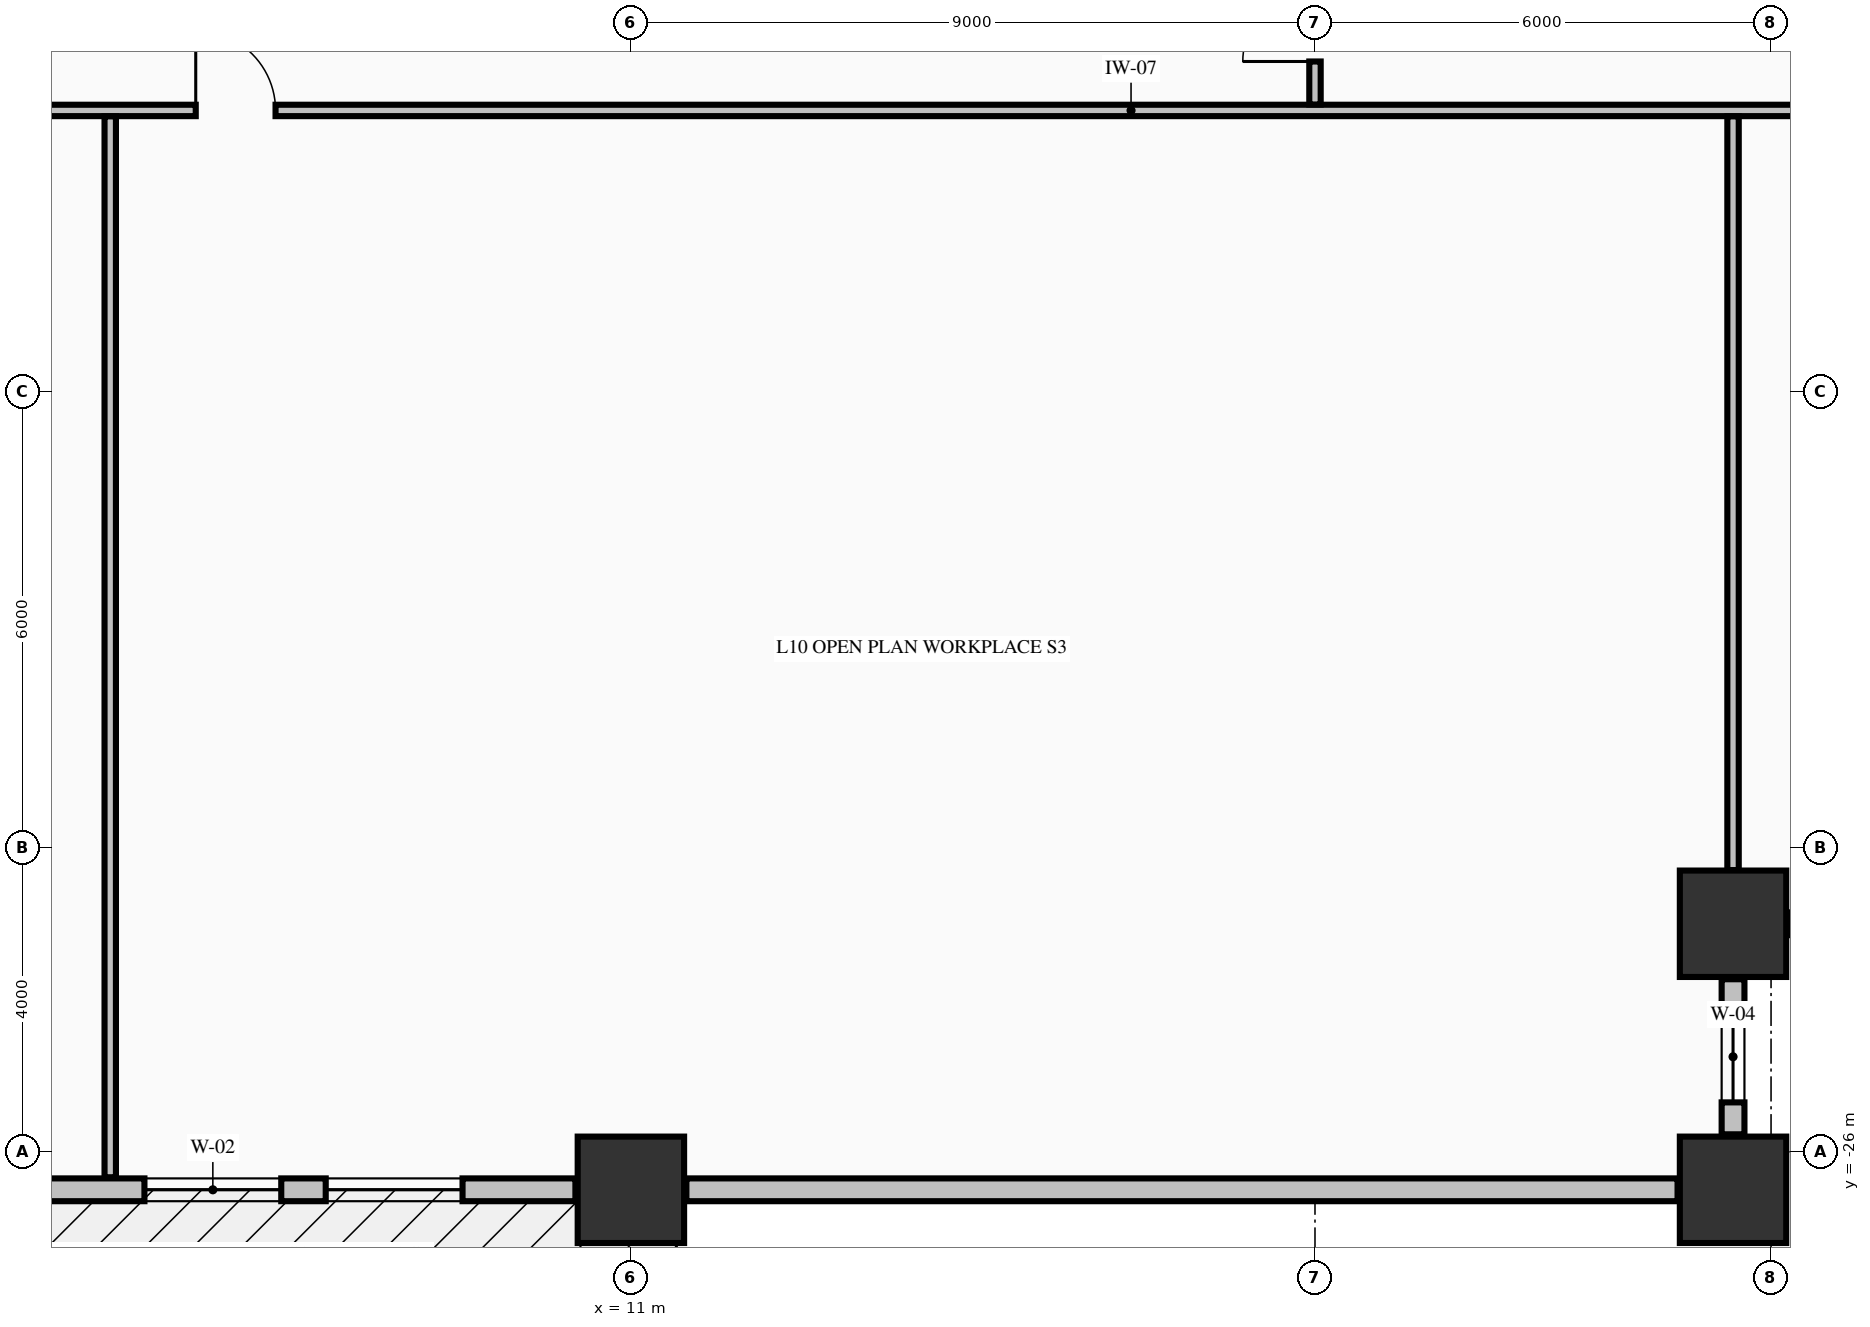
"""IFC4 building model, lengths in metres.
Left out: names, types, materials, properties, quantities, classifications, styles, units other than length and angle.
Written with IfcOpenShell. Run it as: python <this file> out.ifc"""

import sys

from ifc_helpers import new_model, si_unit, direction, frame, frame_2d, origin, origin_2d, place, context, subcontext, project, spatial, rectangle, extrude, element, fill, save


model = new_model("IFC4")
c1 = context("Model", 3, precision=1e-05, world=origin(), true_north=direction((0.0, 1.0)))
c2 = subcontext(c1, "Body", "Model", "MODEL_VIEW")
j1 = project(units=[si_unit("LENGTHUNIT", "METRE"), si_unit("PLANEANGLEUNIT", "RADIAN")], contexts=[c1])
p1 = place(None, origin())
s1 = spatial("IfcSite", under=j1, at=p1, CompositionType="ELEMENT")
p2 = place(p1, origin())
s2 = spatial("IfcBuilding", under=s1, at=p2, CompositionType="ELEMENT")
p3 = place(p2, frame((0.0, 0.0, 45.05)))
s3 = spatial("IfcBuildingStorey", under=s2, at=p3, CompositionType="ELEMENT", Elevation=45.05)
for number, where, z_axis, x_axis in (
    (1, (11.0, -26.5, -0.25), (0.0, 0.0, 1.0), (1.0, 0.0, 0.0)),
    (2, (25.5, -26.5, -0.25), (0.0, 0.0, 1.0), (1.0, 0.0, 0.0)),
    (3, (25.5, -23.0, -0.25), (0.0, 0.0, 1.0), (1.0, 0.0, 0.0)),
):
    element("IfcColumn", number, at=place(p3, frame(where, z_axis=z_axis, x_axis=x_axis)), inside=s3, PredefinedType="COLUMN", context=c2, shape_type="SweptSolid", body=[
        extrude(rectangle(XDim=1.4, YDim=1.4, at=origin_2d()), origin(), (0.0, 0.0, 1.0), 3.57),
    ])
p4 = place(p3, frame((25.5, -25.77, 0.0), z_axis=(0.0, 0.0, 1.0), x_axis=(0.0, 1.0, 0.0)))
e4 = element("IfcWall", 4, at=p4, inside=s3, PredefinedType="STANDARD", context=c2, shape_type="SweptSolid", body=[
    extrude(rectangle(XDim=2.04, YDim=0.3, at=frame_2d((1.02, 0.0))), origin(), (0.0, 0.0, 1.0), 2.712),
])
p5 = place(p4, frame((0.42, 0.0, 0.82)))
e5 = element("IfcOpeningElement", 5, at=p5, cuts=e4, PredefinedType="OPENING", context=c2, shape_type="SweptSolid", body=[
    extrude(rectangle(XDim=1.2, YDim=1.65, at=frame_2d((0.6, 0.825))), frame((0.0, 0.16, 0.0), z_axis=(0.0, -1.0, 0.0), x_axis=(1.0, 0.0, 0.0)), (0.0, 0.0, 1.0), 0.32),
])
p6 = place(p3, frame((26.23, -23.0, 0.0), z_axis=(0.0, 0.0, 1.0), x_axis=(1.0, 0.0, 0.0)))
e6 = element("IfcWall", 6, at=p6, inside=s3, PredefinedType="STANDARD", context=c2, shape_type="SweptSolid", body=[
    extrude(rectangle(XDim=2.04, YDim=0.3, at=frame_2d((1.02, 0.0))), origin(), (0.0, 0.0, 1.0), 2.712),
])
p7 = place(p6, frame((0.42, 0.0, 0.82)))
e7 = element("IfcOpeningElement", 7, at=p7, cuts=e6, PredefinedType="OPENING", context=c2, shape_type="SweptSolid", body=[
    extrude(rectangle(XDim=1.2, YDim=1.65, at=frame_2d((0.6, 0.825))), frame((0.0, 0.16, 0.0), z_axis=(0.0, -1.0, 0.0), x_axis=(1.0, 0.0, 0.0)), (0.0, 0.0, 1.0), 0.32),
])
p8 = place(p3, frame((0.73, -26.5, 0.0), z_axis=(0.0, 0.0, 1.0), x_axis=(1.0, 0.0, 0.0)))
e8 = element("IfcWall", 8, at=p8, inside=s3, PredefinedType="STANDARD", context=c2, shape_type="SweptSolid", body=[
    extrude(rectangle(XDim=9.54, YDim=0.3, at=frame_2d((4.77, 0.0))), origin(), (0.0, 0.0, 1.0), 2.712),
])
p9 = place(p8, frame((3.87, 0.0, 0.78)))
e9 = element("IfcOpeningElement", 9, at=p9, cuts=e8, PredefinedType="OPENING", context=c2, shape_type="SweptSolid", body=[
    extrude(rectangle(XDim=1.8, YDim=1.72, at=frame_2d((0.9, 0.86))), frame((0.0, 0.16, 0.0), z_axis=(0.0, -1.0, 0.0), x_axis=(1.0, 0.0, 0.0)), (0.0, 0.0, 1.0), 0.32),
])
p10 = place(p8, frame((6.255, 0.0, 0.78)))
e10 = element("IfcOpeningElement", 10, at=p10, cuts=e8, PredefinedType="OPENING", context=c2, shape_type="SweptSolid", body=[
    extrude(rectangle(XDim=1.8, YDim=1.72, at=frame_2d((0.9, 0.86))), frame((0.0, 0.16, 0.0), z_axis=(0.0, -1.0, 0.0), x_axis=(1.0, 0.0, 0.0)), (0.0, 0.0, 1.0), 0.32),
])
p11 = place(p3, frame((11.73, -26.5, 0.0), z_axis=(0.0, 0.0, 1.0), x_axis=(1.0, 0.0, 0.0)))
e11 = element("IfcWall", 11, at=p11, inside=s3, PredefinedType="STANDARD", context=c2, shape_type="SweptSolid", body=[
    extrude(rectangle(XDim=13.04, YDim=0.3, at=frame_2d((6.52, 0.0))), origin(), (0.0, 0.0, 1.0), 2.712),
])
p12 = place(p3, frame((-23.835, -12.3, 0.0), z_axis=(0.0, 0.0, 1.0), x_axis=(1.0, 0.0, 0.0)))
e12 = element("IfcWall", 12, at=p12, inside=s3, PredefinedType="PARTITIONING", context=c2, shape_type="SweptSolid", body=[
    extrude(rectangle(XDim=52.67, YDim=0.15, at=frame_2d((26.335, 0.0))), origin(), (0.0, 0.0, 1.0), 3.32),
])
p13 = place(p12, frame((8.99, 0.0, 0.0)))
e13 = element("IfcOpeningElement", 13, at=p13, cuts=e12, PredefinedType="OPENING", context=c2, shape_type="SweptSolid", body=[
    extrude(rectangle(XDim=1.05, YDim=2.15, at=frame_2d((0.525, 1.075))), frame((0.0, 0.085, 0.0), z_axis=(0.0, -1.0, 0.0), x_axis=(1.0, 0.0, 0.0)), (0.0, 0.0, 1.0), 0.17),
])
p14 = place(p12, frame((20.96, 0.0, 0.0)))
e14 = element("IfcOpeningElement", 14, at=p14, cuts=e12, PredefinedType="OPENING", context=c2, shape_type="SweptSolid", body=[
    extrude(rectangle(XDim=1.05, YDim=2.15, at=frame_2d((0.525, 1.075))), frame((0.0, 0.085, 0.0), z_axis=(0.0, -1.0, 0.0), x_axis=(1.0, 0.0, 0.0)), (0.0, 0.0, 1.0), 0.17),
])
p15 = place(p12, frame((29.11, 0.0, 0.0)))
e15 = element("IfcOpeningElement", 15, at=p15, cuts=e12, PredefinedType="OPENING", context=c2, shape_type="SweptSolid", body=[
    extrude(rectangle(XDim=1.05, YDim=2.15, at=frame_2d((0.525, 1.075))), frame((0.0, 0.085, 0.0), z_axis=(0.0, -1.0, 0.0), x_axis=(1.0, 0.0, 0.0)), (0.0, 0.0, 1.0), 0.17),
])
p16 = place(p3, frame((4.15, -26.335, 0.0), z_axis=(0.0, 0.0, 1.0), x_axis=(0.0, 1.0, 0.0)))
e16 = element("IfcWall", 16, at=p16, inside=s3, PredefinedType="PARTITIONING", context=c2, shape_type="SweptSolid", body=[
    extrude(rectangle(XDim=13.957, YDim=0.15, at=frame_2d((6.979, 0.0))), origin(), (0.0, 0.0, 1.0), 3.32),
])
p17 = place(p3, frame((20.0, -12.222, 0.0), z_axis=(0.0, 0.0, 1.0), x_axis=(0.0, 1.0, 0.0)))
e17 = element("IfcWall", 17, at=p17, inside=s3, PredefinedType="PARTITIONING", context=c2, shape_type="SweptSolid", body=[
    extrude(rectangle(XDim=1.666, YDim=0.15, at=frame_2d((0.833, 0.0))), origin(), (0.0, 0.0, 1.0), 2.66),
])
p18 = place(p17, frame((0.566, 0.0, 0.0)))
e18 = element("IfcOpeningElement", 18, at=p18, cuts=e17, PredefinedType="OPENING", context=c2, shape_type="SweptSolid", body=[
    extrude(rectangle(XDim=0.95, YDim=2.15, at=frame_2d((0.475, 1.075))), frame((0.0, 0.085, 0.0), z_axis=(0.0, -1.0, 0.0), x_axis=(1.0, 0.0, 0.0)), (0.0, 0.0, 1.0), 0.17),
])
p19 = place(p3, frame((25.5, -22.294, 0.0), z_axis=(0.0, 0.0, 1.0), x_axis=(0.0, 1.0, 0.0)))
e19 = element("IfcWall", 19, at=p19, inside=s3, PredefinedType="PARTITIONING", context=c2, shape_type="SweptSolid", body=[
    extrude(rectangle(XDim=9.916, YDim=0.15, at=frame_2d((4.958, 0.0))), origin(), (0.0, 0.0, 1.0), 3.32),
])
p20 = place(p5, origin())
e20 = element("IfcWindow", 20, at=p20, inside=s3, PartitioningType="SINGLE_PANEL", PredefinedType="WINDOW", context=c2, shape_type="SweptSolid", body=[
    extrude(rectangle(XDim=1.2, YDim=1.65, at=frame_2d((0.6, 0.825))), frame((0.0, 0.03, 0.0), z_axis=(0.0, -1.0, 0.0), x_axis=(1.0, 0.0, 0.0)), (0.0, 0.0, 1.0), 0.06),
])
fill(e5, e20)
p21 = place(p9, origin())
e21 = element("IfcWindow", 21, at=p21, inside=s3, PartitioningType="SINGLE_PANEL", PredefinedType="WINDOW", context=c2, shape_type="SweptSolid", body=[
    extrude(rectangle(XDim=1.8, YDim=1.72, at=frame_2d((0.9, 0.86))), frame((0.0, 0.03, 0.0), z_axis=(0.0, -1.0, 0.0), x_axis=(1.0, 0.0, 0.0)), (0.0, 0.0, 1.0), 0.06),
])
fill(e9, e21)
p22 = place(p10, origin())
e22 = element("IfcWindow", 22, at=p22, inside=s3, PartitioningType="SINGLE_PANEL", PredefinedType="WINDOW", context=c2, shape_type="SweptSolid", body=[
    extrude(rectangle(XDim=1.8, YDim=1.72, at=frame_2d((0.9, 0.86))), frame((0.0, 0.03, 0.0), z_axis=(0.0, -1.0, 0.0), x_axis=(1.0, 0.0, 0.0)), (0.0, 0.0, 1.0), 0.06),
])
fill(e10, e22)
p23 = place(p15, origin())
e23 = element("IfcDoor", 23, at=p23, inside=s3, OperationType="SINGLE_SWING_LEFT", PredefinedType="DOOR", context=c2, shape_type="SweptSolid", body=[
    extrude(rectangle(XDim=1.05, YDim=2.15, at=frame_2d((0.525, 1.075))), frame((0.0, 0.025, 0.0), z_axis=(0.0, -1.0, 0.0), x_axis=(1.0, 0.0, 0.0)), (0.0, 0.0, 1.0), 0.05),
])
fill(e15, e23)
p24 = place(p18, origin())
e24 = element("IfcDoor", 24, at=p24, inside=s3, OperationType="SINGLE_SWING_LEFT", PredefinedType="DOOR", context=c2, shape_type="SweptSolid", body=[
    extrude(rectangle(XDim=0.95, YDim=2.15, at=frame_2d((0.475, 1.075))), frame((0.0, 0.025, 0.0), z_axis=(0.0, -1.0, 0.0), x_axis=(1.0, 0.0, 0.0)), (0.0, 0.0, 1.0), 0.05),
])
fill(e18, e24)
save(model, sys.argv[1])
